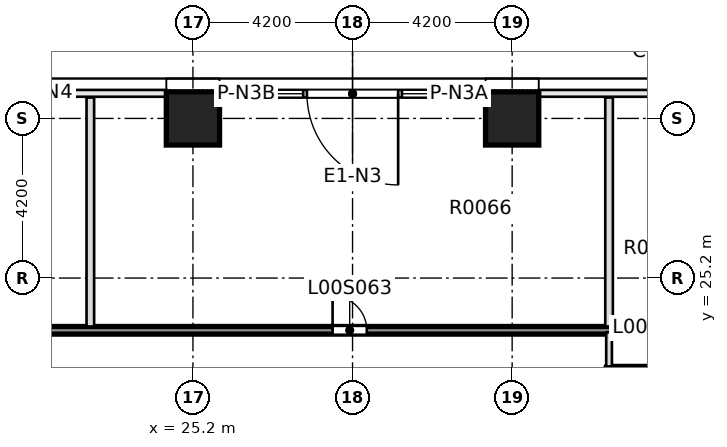
"""IFC4 building model, lengths in metres.
Left out: names, types, materials, properties, quantities, classifications, styles, units other than length and angle.
Written with IfcOpenShell. Run it as: python <this file> out.ifc"""

import sys

from ifc_helpers import new_model, si_unit, direction, frame, frame_2d, origin, origin_2d, place, context, subcontext, project, spatial, rectangle, extrude, element, fill, save


model = new_model("IFC4")
c1 = context("Model", 3, precision=1e-05, world=origin(), true_north=direction((0.0, 1.0)))
c2 = subcontext(c1, "Body", "Model", "MODEL_VIEW")
j1 = project(units=[si_unit("LENGTHUNIT", "METRE"), si_unit("PLANEANGLEUNIT", "RADIAN")], contexts=[c1])
p1 = place(None, origin())
s1 = spatial("IfcSite", under=j1, at=p1, CompositionType="ELEMENT")
p2 = place(p1, origin())
s2 = spatial("IfcBuilding", under=s1, at=p2, CompositionType="ELEMENT")
p3 = place(p2, origin())
s3 = spatial("IfcBuildingStorey", under=s2, at=p3, CompositionType="ELEMENT", Elevation=0.0)
for number, where, z_axis, x_axis in (
    (1, (25.2, 29.4, 0.0), (0.0, 0.0, 1.0), (1.0, 0.0, 0.0)),
    (2, (33.6, 29.4, 0.0), (0.0, 0.0, 1.0), (1.0, 0.0, 0.0)),
):
    element("IfcColumn", number, at=place(p3, frame(where, z_axis=z_axis, x_axis=x_axis)), inside=s3, PredefinedType="COLUMN", context=c2, shape_type="SweptSolid", body=[
        extrude(rectangle(XDim=1.4, YDim=1.4, at=origin_2d()), origin(), (0.0, 0.0, 1.0), 7.5),
    ])
p4 = place(p3, frame((36.075, 22.775, 0.0), z_axis=(0.0, 0.0, 1.0), x_axis=(1.0, 0.0, 0.0)))
e3 = element("IfcWall", 3, at=p4, inside=s3, PredefinedType="SOLIDWALL", context=c2, shape_type="SweptSolid", body=[
    extrude(rectangle(XDim=6.3, YDim=0.2, at=frame_2d((3.15, 0.0))), origin(), (0.0, 0.0, 1.0), 7.1),
])
p5 = place(p4, frame((0.675, 0.0, 0.0)))
e4 = element("IfcOpeningElement", 4, at=p5, cuts=e3, PredefinedType="OPENING", context=c2, shape_type="SweptSolid", body=[
    extrude(rectangle(XDim=1.2, YDim=2.1, at=frame_2d((0.6, 1.05))), frame((0.0, 0.11, 0.0), z_axis=(0.0, -1.0, 0.0), x_axis=(1.0, 0.0, 0.0)), (0.0, 0.0, 1.0), 0.22),
])
p6 = place(p3, frame((-15.2, 23.825, 0.0), z_axis=(0.0, 0.0, 1.0), x_axis=(1.0, 0.0, 0.0)))
e5 = element("IfcWall", 5, at=p6, inside=s3, PredefinedType="SOLIDWALL", context=c2, shape_type="SweptSolid", body=[
    extrude(rectangle(XDim=51.45, YDim=0.2, at=frame_2d((25.725, 0.0))), origin(), (0.0, 0.0, 1.0), 7.1),
])
p7 = place(p6, frame((17.9, 0.0, 0.0)))
e6 = element("IfcOpeningElement", 6, at=p7, cuts=e5, PredefinedType="OPENING", context=c2, shape_type="SweptSolid", body=[
    extrude(rectangle(XDim=1.2, YDim=2.1, at=frame_2d((0.6, 1.05))), frame((0.0, 0.11, 0.0), z_axis=(0.0, -1.0, 0.0), x_axis=(1.0, 0.0, 0.0)), (0.0, 0.0, 1.0), 0.22),
])
p8 = place(p6, frame((1.7, 0.0, 0.0)))
e7 = element("IfcOpeningElement", 7, at=p8, cuts=e5, PredefinedType="OPENING", context=c2, shape_type="SweptSolid", body=[
    extrude(rectangle(XDim=0.9, YDim=2.1, at=frame_2d((0.45, 1.05))), frame((0.0, 0.11, 0.0), z_axis=(0.0, -1.0, 0.0), x_axis=(1.0, 0.0, 0.0)), (0.0, 0.0, 1.0), 0.22),
])
p9 = place(p6, frame((7.925, 0.0, 0.0)))
e8 = element("IfcOpeningElement", 8, at=p9, cuts=e5, PredefinedType="OPENING", context=c2, shape_type="SweptSolid", body=[
    extrude(rectangle(XDim=1.5, YDim=2.1, at=frame_2d((0.75, 1.05))), frame((0.0, 0.11, 0.0), z_axis=(0.0, -1.0, 0.0), x_axis=(1.0, 0.0, 0.0)), (0.0, 0.0, 1.0), 0.22),
])
p10 = place(p6, frame((24.05, 0.0, 0.0)))
e9 = element("IfcOpeningElement", 9, at=p10, cuts=e5, PredefinedType="OPENING", context=c2, shape_type="SweptSolid", body=[
    extrude(rectangle(XDim=0.9, YDim=2.1, at=frame_2d((0.45, 1.05))), frame((0.0, 0.11, 0.0), z_axis=(0.0, -1.0, 0.0), x_axis=(1.0, 0.0, 0.0)), (0.0, 0.0, 1.0), 0.22),
])
p11 = place(p6, frame((33.05, 0.0, 0.0)))
e10 = element("IfcOpeningElement", 10, at=p11, cuts=e5, PredefinedType="OPENING", context=c2, shape_type="SweptSolid", body=[
    extrude(rectangle(XDim=0.9, YDim=2.1, at=frame_2d((0.45, 1.05))), frame((0.0, 0.11, 0.0), z_axis=(0.0, -1.0, 0.0), x_axis=(1.0, 0.0, 0.0)), (0.0, 0.0, 1.0), 0.22),
])
p12 = place(p6, frame((44.075, 0.0, 0.0)))
e11 = element("IfcOpeningElement", 11, at=p12, cuts=e5, PredefinedType="OPENING", context=c2, shape_type="SweptSolid", body=[
    extrude(rectangle(XDim=0.9, YDim=2.1, at=frame_2d((0.45, 1.05))), frame((0.0, 0.11, 0.0), z_axis=(0.0, -1.0, 0.0), x_axis=(1.0, 0.0, 0.0)), (0.0, 0.0, 1.0), 0.22),
])
p13 = place(p3, frame((22.5, 23.925, 0.0), z_axis=(0.0, 0.0, 1.0), x_axis=(0.0, 1.0, 0.0)))
e12 = element("IfcWall", 12, at=p13, inside=s3, PredefinedType="PARTITIONING", context=c2, shape_type="SweptSolid", body=[
    extrude(rectangle(XDim=6.025, YDim=0.2, at=frame_2d((3.012, 0.0))), origin(), (0.0, 0.0, 1.0), 7.1),
])
p14 = place(p3, frame((36.15, 22.875, 0.0), z_axis=(0.0, 0.0, 1.0), x_axis=(0.0, 1.0, 0.0)))
e13 = element("IfcWall", 13, at=p14, inside=s3, PredefinedType="PARTITIONING", context=c2, shape_type="SweptSolid", body=[
    extrude(rectangle(XDim=0.9, YDim=0.15, at=frame_2d((0.45, 0.0))), origin(), (0.0, 0.0, 1.0), 7.1),
])
p15 = place(p3, frame((36.15, 23.925, 0.0), z_axis=(0.0, 0.0, 1.0), x_axis=(0.0, 1.0, 0.0)))
e14 = element("IfcWall", 14, at=p15, inside=s3, PredefinedType="PARTITIONING", context=c2, shape_type="SweptSolid", body=[
    extrude(rectangle(XDim=6.025, YDim=0.2, at=frame_2d((3.012, 0.0))), origin(), (0.0, 0.0, 1.0), 7.1),
])
p16 = place(p3, frame((25.9, 30.05, 0.0), z_axis=(0.0, 0.0, 1.0), x_axis=(1.0, 0.0, 0.0)))
e15 = element("IfcWall", 15, at=p16, inside=s3, PredefinedType="STANDARD", context=c2, shape_type="SweptSolid", body=[
    extrude(rectangle(XDim=7.0, YDim=0.2, at=frame_2d((3.5, 0.0))), origin(), (0.0, 0.0, 1.0), 7.1),
])
p17 = place(p16, frame((4.8, 0.0, 0.3)))
e16 = element("IfcOpeningElement", 16, at=p17, cuts=e15, PredefinedType="OPENING", context=c2, shape_type="SweptSolid", body=[
    extrude(rectangle(XDim=1.8, YDim=4.2, at=frame_2d((0.9, 2.1))), frame((0.0, 0.11, 0.0), z_axis=(0.0, -1.0, 0.0), x_axis=(1.0, 0.0, 0.0)), (0.0, 0.0, 1.0), 0.22),
])
p18 = place(p16, frame((2.3, 0.0, 0.0)))
e17 = element("IfcOpeningElement", 17, at=p18, cuts=e15, PredefinedType="OPENING", context=c2, shape_type="SweptSolid", body=[
    extrude(rectangle(XDim=2.4, YDim=2.4, at=frame_2d((1.2, 1.2))), frame((0.0, 0.11, 0.0), z_axis=(0.0, -1.0, 0.0), x_axis=(1.0, 0.0, 0.0)), (0.0, 0.0, 1.0), 0.22),
])
p19 = place(p16, frame((0.4, 0.0, 0.3)))
e18 = element("IfcOpeningElement", 18, at=p19, cuts=e15, PredefinedType="OPENING", context=c2, shape_type="SweptSolid", body=[
    extrude(rectangle(XDim=1.8, YDim=4.2, at=frame_2d((0.9, 2.1))), frame((0.0, 0.11, 0.0), z_axis=(0.0, -1.0, 0.0), x_axis=(1.0, 0.0, 0.0)), (0.0, 0.0, 1.0), 0.22),
])
p20 = place(p12, origin())
e19 = element("IfcDoor", 19, at=p20, inside=s3, OperationType="SINGLE_SWING_RIGHT", PredefinedType="DOOR", context=c2, shape_type="SweptSolid", body=[
    extrude(rectangle(XDim=0.9, YDim=2.1, at=frame_2d((0.45, 1.05))), frame((0.0, 0.025, 0.0), z_axis=(0.0, -1.0, 0.0), x_axis=(1.0, 0.0, 0.0)), (0.0, 0.0, 1.0), 0.05),
])
fill(e11, e19)
p21 = place(p17, origin())
e20 = element("IfcWindow", 20, at=p21, inside=s3, PartitioningType="SINGLE_PANEL", PredefinedType="WINDOW", context=c2, shape_type="SweptSolid", body=[
    extrude(rectangle(XDim=1.8, YDim=4.2, at=frame_2d((0.9, 2.1))), frame((0.0, 0.03, 0.0), z_axis=(0.0, -1.0, 0.0), x_axis=(1.0, 0.0, 0.0)), (0.0, 0.0, 1.0), 0.06),
])
fill(e16, e20)
p22 = place(p18, origin())
e21 = element("IfcDoor", 21, at=p22, inside=s3, OperationType="SINGLE_SWING_LEFT", PredefinedType="DOOR", context=c2, shape_type="SweptSolid", body=[
    extrude(rectangle(XDim=2.4, YDim=2.4, at=frame_2d((1.2, 1.2))), frame((0.0, 0.025, 0.0), z_axis=(0.0, -1.0, 0.0), x_axis=(1.0, 0.0, 0.0)), (0.0, 0.0, 1.0), 0.05),
])
fill(e17, e21)
p23 = place(p19, origin())
e22 = element("IfcWindow", 22, at=p23, inside=s3, PartitioningType="SINGLE_PANEL", PredefinedType="WINDOW", context=c2, shape_type="SweptSolid", body=[
    extrude(rectangle(XDim=1.8, YDim=4.2, at=frame_2d((0.9, 2.1))), frame((0.0, 0.03, 0.0), z_axis=(0.0, -1.0, 0.0), x_axis=(1.0, 0.0, 0.0)), (0.0, 0.0, 1.0), 0.06),
])
fill(e18, e22)
save(model, sys.argv[1])
